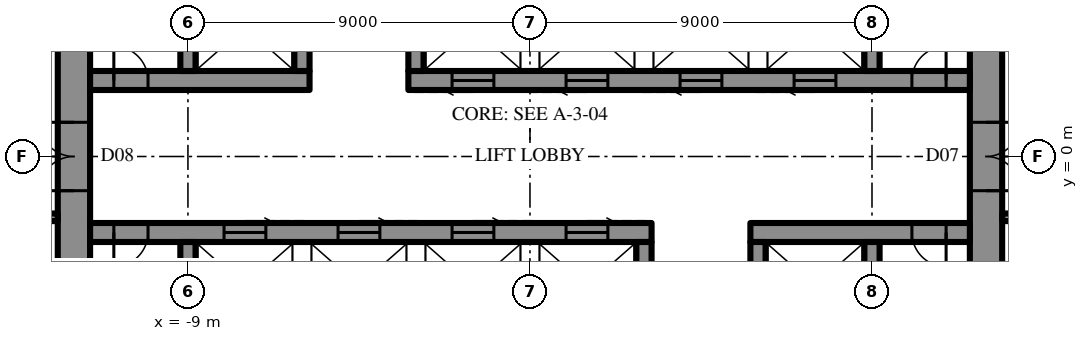
"""IFC4 building model, lengths in metres.
Left out: names, types, materials, properties, quantities, classifications, styles, units other than length and angle.
Written with IfcOpenShell. Run it as: python <this file> out.ifc"""

import sys

from ifc_helpers import new_model, si_unit, direction, frame, frame_2d, origin, place, context, subcontext, project, spatial, rectangle, extrude, element, fill, save


model = new_model("IFC4")
c1 = context("Model", 3, precision=1e-05, world=origin(), true_north=direction((0.0, 1.0)))
c2 = subcontext(c1, "Body", "Model", "MODEL_VIEW")
j1 = project(units=[si_unit("LENGTHUNIT", "METRE"), si_unit("PLANEANGLEUNIT", "RADIAN")], contexts=[c1])
p1 = place(None, origin())
s1 = spatial("IfcSite", under=j1, at=p1, CompositionType="ELEMENT")
p2 = place(p1, origin())
s2 = spatial("IfcBuilding", under=s1, at=p2, CompositionType="ELEMENT")
p3 = place(p2, frame((0.0, 0.0, 336.7)))
s3 = spatial("IfcBuildingStorey", under=s2, at=p3, CompositionType="ELEMENT", Elevation=336.7)
p4 = place(p3, frame((12.0, -10.7, 0.0), z_axis=(0.0, 0.0, 1.0), x_axis=(0.0, 1.0, 0.0)))
e1 = element("IfcWall", 1, at=p4, inside=s3, PredefinedType="SHEAR", context=c2, shape_type="SweptSolid", body=[
    extrude(rectangle(XDim=21.4, YDim=0.85, at=frame_2d((10.7, 0.0))), origin(), (0.0, 0.0, 1.0), 4.2),
])
p5 = place(p4, frame((9.8, 0.0, 0.0)))
e2 = element("IfcOpeningElement", 2, at=p5, cuts=e1, PredefinedType="OPENING", context=c2, shape_type="SweptSolid", body=[
    extrude(rectangle(XDim=1.8, YDim=2.4, at=frame_2d((0.9, 1.2))), frame((0.0, 0.435, 0.0), z_axis=(0.0, -1.0, 0.0), x_axis=(1.0, 0.0, 0.0)), (0.0, 0.0, 1.0), 0.87),
])
p6 = place(p3, frame((-12.0, 10.7, 0.0), z_axis=(0.0, 0.0, 1.0), x_axis=(0.0, -1.0, 0.0)))
e3 = element("IfcWall", 3, at=p6, inside=s3, PredefinedType="SHEAR", context=c2, shape_type="SweptSolid", body=[
    extrude(rectangle(XDim=21.4, YDim=0.85, at=frame_2d((10.7, 0.0))), origin(), (0.0, 0.0, 1.0), 4.2),
])
p7 = place(p6, frame((9.8, 0.0, 0.0)))
e4 = element("IfcOpeningElement", 4, at=p7, cuts=e3, PredefinedType="OPENING", context=c2, shape_type="SweptSolid", body=[
    extrude(rectangle(XDim=1.8, YDim=2.4, at=frame_2d((0.9, 1.2))), frame((0.0, 0.435, 0.0), z_axis=(0.0, -1.0, 0.0), x_axis=(1.0, 0.0, 0.0)), (0.0, 0.0, 1.0), 0.87),
])
p8 = place(p3, frame((-11.575, 2.0, 0.0), z_axis=(0.0, 0.0, 1.0), x_axis=(1.0, 0.0, 0.0)))
e5 = element("IfcWall", 5, at=p8, inside=s3, PredefinedType="SHEAR", context=c2, shape_type="SweptSolid", body=[
    extrude(rectangle(XDim=5.775, YDim=0.5, at=frame_2d((2.887, 0.0))), origin(), (0.0, 0.0, 1.0), 4.2),
])
p9 = place(p8, frame((0.625, 0.0, 0.0)))
e6 = element("IfcOpeningElement", 6, at=p9, cuts=e5, PredefinedType="OPENING", context=c2, shape_type="SweptSolid", body=[
    extrude(rectangle(XDim=0.9, YDim=2.2, at=frame_2d((0.45, 1.1))), frame((0.0, 0.26, 0.0), z_axis=(0.0, -1.0, 0.0), x_axis=(1.0, 0.0, 0.0)), (0.0, 0.0, 1.0), 0.52),
])
p10 = place(p3, frame((-3.2, 2.0, 0.0), z_axis=(0.0, 0.0, 1.0), x_axis=(1.0, 0.0, 0.0)))
e7 = element("IfcWall", 7, at=p10, inside=s3, PredefinedType="SHEAR", context=c2, shape_type="SweptSolid", body=[
    extrude(rectangle(XDim=14.775, YDim=0.5, at=frame_2d((7.387, 0.0))), origin(), (0.0, 0.0, 1.0), 4.2),
])
p11 = place(p10, frame((13.25, 0.0, 0.0)))
e8 = element("IfcOpeningElement", 8, at=p11, cuts=e7, PredefinedType="OPENING", context=c2, shape_type="SweptSolid", body=[
    extrude(rectangle(XDim=0.9, YDim=2.2, at=frame_2d((0.45, 1.1))), frame((0.0, 0.26, 0.0), z_axis=(0.0, -1.0, 0.0), x_axis=(1.0, 0.0, 0.0)), (0.0, 0.0, 1.0), 0.52),
])
p12 = place(p10, frame((1.15, 0.0, 0.0)))
e9 = element("IfcOpeningElement", 9, at=p12, cuts=e7, PredefinedType="OPENING", context=c2, shape_type="SweptSolid", body=[
    extrude(rectangle(XDim=1.1, YDim=2.2, at=frame_2d((0.55, 1.1))), frame((0.0, 0.26, 0.0), z_axis=(0.0, -1.0, 0.0), x_axis=(1.0, 0.0, 0.0)), (0.0, 0.0, 1.0), 0.52),
])
p13 = place(p10, frame((4.15, 0.0, 0.0)))
e10 = element("IfcOpeningElement", 10, at=p13, cuts=e7, PredefinedType="OPENING", context=c2, shape_type="SweptSolid", body=[
    extrude(rectangle(XDim=1.1, YDim=2.2, at=frame_2d((0.55, 1.1))), frame((0.0, 0.26, 0.0), z_axis=(0.0, -1.0, 0.0), x_axis=(1.0, 0.0, 0.0)), (0.0, 0.0, 1.0), 0.52),
])
p14 = place(p10, frame((7.15, 0.0, 0.0)))
e11 = element("IfcOpeningElement", 11, at=p14, cuts=e7, PredefinedType="OPENING", context=c2, shape_type="SweptSolid", body=[
    extrude(rectangle(XDim=1.1, YDim=2.2, at=frame_2d((0.55, 1.1))), frame((0.0, 0.26, 0.0), z_axis=(0.0, -1.0, 0.0), x_axis=(1.0, 0.0, 0.0)), (0.0, 0.0, 1.0), 0.52),
])
p15 = place(p10, frame((10.15, 0.0, 0.0)))
e12 = element("IfcOpeningElement", 12, at=p15, cuts=e7, PredefinedType="OPENING", context=c2, shape_type="SweptSolid", body=[
    extrude(rectangle(XDim=1.1, YDim=2.2, at=frame_2d((0.55, 1.1))), frame((0.0, 0.26, 0.0), z_axis=(0.0, -1.0, 0.0), x_axis=(1.0, 0.0, 0.0)), (0.0, 0.0, 1.0), 0.52),
])
for number, where, z_axis, x_axis in (
    (13, (-9.0, 2.25, 0.0), (0.0, 0.0, 1.0), (0.0, 1.0, 0.0)),
    (14, (-6.0, 2.25, 0.0), (0.0, 0.0, 1.0), (0.0, 1.0, 0.0)),
    (15, (-3.0, 2.25, 0.0), (0.0, 0.0, 1.0), (0.0, 1.0, 0.0)),
    (16, (9.0, 2.25, 0.0), (0.0, 0.0, 1.0), (0.0, 1.0, 0.0)),
):
    element("IfcWall", number, at=place(p3, frame(where, z_axis=z_axis, x_axis=x_axis)), inside=s3, PredefinedType="SHEAR", context=c2, shape_type="SweptSolid", body=[
        extrude(rectangle(XDim=2.3, YDim=0.4, at=frame_2d((1.15, 0.0))), origin(), (0.0, 0.0, 1.0), 4.2),
    ])
p16 = place(p3, frame((11.575, -2.0, 0.0), z_axis=(0.0, 0.0, 1.0), x_axis=(-1.0, 0.0, 0.0)))
e17 = element("IfcWall", 17, at=p16, inside=s3, PredefinedType="SHEAR", context=c2, shape_type="SweptSolid", body=[
    extrude(rectangle(XDim=5.775, YDim=0.5, at=frame_2d((2.887, 0.0))), origin(), (0.0, 0.0, 1.0), 4.2),
])
p17 = place(p16, frame((0.625, 0.0, 0.0)))
e18 = element("IfcOpeningElement", 18, at=p17, cuts=e17, PredefinedType="OPENING", context=c2, shape_type="SweptSolid", body=[
    extrude(rectangle(XDim=0.9, YDim=2.2, at=frame_2d((0.45, 1.1))), frame((0.0, 0.26, 0.0), z_axis=(0.0, -1.0, 0.0), x_axis=(1.0, 0.0, 0.0)), (0.0, 0.0, 1.0), 0.52),
])
p18 = place(p3, frame((3.2, -2.0, 0.0), z_axis=(0.0, 0.0, 1.0), x_axis=(-1.0, 0.0, 0.0)))
e19 = element("IfcWall", 19, at=p18, inside=s3, PredefinedType="SHEAR", context=c2, shape_type="SweptSolid", body=[
    extrude(rectangle(XDim=14.775, YDim=0.5, at=frame_2d((7.387, 0.0))), origin(), (0.0, 0.0, 1.0), 4.2),
])
p19 = place(p18, frame((13.25, 0.0, 0.0)))
e20 = element("IfcOpeningElement", 20, at=p19, cuts=e19, PredefinedType="OPENING", context=c2, shape_type="SweptSolid", body=[
    extrude(rectangle(XDim=0.9, YDim=2.2, at=frame_2d((0.45, 1.1))), frame((0.0, 0.26, 0.0), z_axis=(0.0, -1.0, 0.0), x_axis=(1.0, 0.0, 0.0)), (0.0, 0.0, 1.0), 0.52),
])
p20 = place(p18, frame((1.15, 0.0, 0.0)))
e21 = element("IfcOpeningElement", 21, at=p20, cuts=e19, PredefinedType="OPENING", context=c2, shape_type="SweptSolid", body=[
    extrude(rectangle(XDim=1.1, YDim=2.2, at=frame_2d((0.55, 1.1))), frame((0.0, 0.26, 0.0), z_axis=(0.0, -1.0, 0.0), x_axis=(1.0, 0.0, 0.0)), (0.0, 0.0, 1.0), 0.52),
])
p21 = place(p18, frame((4.15, 0.0, 0.0)))
e22 = element("IfcOpeningElement", 22, at=p21, cuts=e19, PredefinedType="OPENING", context=c2, shape_type="SweptSolid", body=[
    extrude(rectangle(XDim=1.1, YDim=2.2, at=frame_2d((0.55, 1.1))), frame((0.0, 0.26, 0.0), z_axis=(0.0, -1.0, 0.0), x_axis=(1.0, 0.0, 0.0)), (0.0, 0.0, 1.0), 0.52),
])
p22 = place(p18, frame((7.15, 0.0, 0.0)))
e23 = element("IfcOpeningElement", 23, at=p22, cuts=e19, PredefinedType="OPENING", context=c2, shape_type="SweptSolid", body=[
    extrude(rectangle(XDim=1.1, YDim=2.2, at=frame_2d((0.55, 1.1))), frame((0.0, 0.26, 0.0), z_axis=(0.0, -1.0, 0.0), x_axis=(1.0, 0.0, 0.0)), (0.0, 0.0, 1.0), 0.52),
])
p23 = place(p18, frame((10.15, 0.0, 0.0)))
e24 = element("IfcOpeningElement", 24, at=p23, cuts=e19, PredefinedType="OPENING", context=c2, shape_type="SweptSolid", body=[
    extrude(rectangle(XDim=1.1, YDim=2.2, at=frame_2d((0.55, 1.1))), frame((0.0, 0.26, 0.0), z_axis=(0.0, -1.0, 0.0), x_axis=(1.0, 0.0, 0.0)), (0.0, 0.0, 1.0), 0.52),
])
for number, where, z_axis, x_axis in (
    (25, (9.0, -2.25, 0.0), (0.0, 0.0, 1.0), (0.0, -1.0, 0.0)),
    (26, (6.0, -2.25, 0.0), (0.0, 0.0, 1.0), (0.0, -1.0, 0.0)),
    (27, (3.0, -2.25, 0.0), (0.0, 0.0, 1.0), (0.0, -1.0, 0.0)),
    (28, (-9.0, -2.25, 0.0), (0.0, 0.0, 1.0), (0.0, -1.0, 0.0)),
):
    element("IfcWall", number, at=place(p3, frame(where, z_axis=z_axis, x_axis=x_axis)), inside=s3, PredefinedType="SHEAR", context=c2, shape_type="SweptSolid", body=[
        extrude(rectangle(XDim=2.3, YDim=0.4, at=frame_2d((1.15, 0.0))), origin(), (0.0, 0.0, 1.0), 4.2),
    ])
p24 = place(p3, frame((12.425, -1.6, 0.0), z_axis=(0.0, 0.0, 1.0), x_axis=(1.0, 0.0, 0.0)))
e29 = element("IfcWall", 29, at=p24, inside=s3, PredefinedType="PARTITIONING", context=c2, shape_type="SweptSolid", body=[
    extrude(rectangle(XDim=16.5, YDim=0.2, at=frame_2d((8.25, 0.0))), origin(), (0.0, 0.0, 1.0), 4.0),
])
p25 = place(p24, frame((1.15, 0.0, 0.0)))
e30 = element("IfcOpeningElement", 30, at=p25, cuts=e29, PredefinedType="OPENING", context=c2, shape_type="SweptSolid", body=[
    extrude(rectangle(XDim=1.0, YDim=2.2, at=frame_2d((0.5, 1.1))), frame((0.0, 0.11, 0.0), z_axis=(0.0, -1.0, 0.0), x_axis=(1.0, 0.0, 0.0)), (0.0, 0.0, 1.0), 0.22),
])
p26 = place(p3, frame((-12.425, -1.6, 0.0), z_axis=(0.0, 0.0, 1.0), x_axis=(-1.0, 0.0, 0.0)))
e31 = element("IfcWall", 31, at=p26, inside=s3, PredefinedType="PARTITIONING", context=c2, shape_type="SweptSolid", body=[
    extrude(rectangle(XDim=16.5, YDim=0.2, at=frame_2d((8.25, 0.0))), origin(), (0.0, 0.0, 1.0), 4.0),
])
p27 = place(p26, frame((1.15, 0.0, 0.0)))
e32 = element("IfcOpeningElement", 32, at=p27, cuts=e31, PredefinedType="OPENING", context=c2, shape_type="SweptSolid", body=[
    extrude(rectangle(XDim=1.0, YDim=2.2, at=frame_2d((0.5, 1.1))), frame((0.0, 0.11, 0.0), z_axis=(0.0, -1.0, 0.0), x_axis=(1.0, 0.0, 0.0)), (0.0, 0.0, 1.0), 0.22),
])
p28 = place(p5, frame((1.8, 0.0, 0.0), z_axis=(0.0, 0.0, 1.0), x_axis=(-1.0, 0.0, 0.0)))
e33 = element("IfcDoor", 33, at=p28, inside=s3, OperationType="DOUBLE_DOOR_SINGLE_SWING", PredefinedType="DOOR", context=c2, shape_type="SweptSolid", body=[
    extrude(rectangle(XDim=1.8, YDim=2.4, at=frame_2d((0.9, 1.2))), frame((0.0, 0.025, 0.0), z_axis=(0.0, -1.0, 0.0), x_axis=(1.0, 0.0, 0.0)), (0.0, 0.0, 1.0), 0.05),
])
fill(e2, e33)
p29 = place(p7, frame((1.8, 0.0, 0.0), z_axis=(0.0, 0.0, 1.0), x_axis=(-1.0, 0.0, 0.0)))
e34 = element("IfcDoor", 34, at=p29, inside=s3, OperationType="DOUBLE_DOOR_SINGLE_SWING", PredefinedType="DOOR", context=c2, shape_type="SweptSolid", body=[
    extrude(rectangle(XDim=1.8, YDim=2.4, at=frame_2d((0.9, 1.2))), frame((0.0, 0.025, 0.0), z_axis=(0.0, -1.0, 0.0), x_axis=(1.0, 0.0, 0.0)), (0.0, 0.0, 1.0), 0.05),
])
fill(e4, e34)
p30 = place(p9, origin())
e35 = element("IfcDoor", 35, at=p30, inside=s3, OperationType="SINGLE_SWING_RIGHT", PredefinedType="DOOR", context=c2, shape_type="SweptSolid", body=[
    extrude(rectangle(XDim=0.9, YDim=2.2, at=frame_2d((0.45, 1.1))), frame((0.0, 0.025, 0.0), z_axis=(0.0, -1.0, 0.0), x_axis=(1.0, 0.0, 0.0)), (0.0, 0.0, 1.0), 0.05),
])
fill(e6, e35)
p31 = place(p11, origin())
e36 = element("IfcDoor", 36, at=p31, inside=s3, OperationType="SINGLE_SWING_LEFT", PredefinedType="DOOR", context=c2, shape_type="SweptSolid", body=[
    extrude(rectangle(XDim=0.9, YDim=2.2, at=frame_2d((0.45, 1.1))), frame((0.0, 0.025, 0.0), z_axis=(0.0, -1.0, 0.0), x_axis=(1.0, 0.0, 0.0)), (0.0, 0.0, 1.0), 0.05),
])
fill(e8, e36)
p32 = place(p17, origin())
e37 = element("IfcDoor", 37, at=p32, inside=s3, OperationType="SINGLE_SWING_RIGHT", PredefinedType="DOOR", context=c2, shape_type="SweptSolid", body=[
    extrude(rectangle(XDim=0.9, YDim=2.2, at=frame_2d((0.45, 1.1))), frame((0.0, 0.025, 0.0), z_axis=(0.0, -1.0, 0.0), x_axis=(1.0, 0.0, 0.0)), (0.0, 0.0, 1.0), 0.05),
])
fill(e18, e37)
p33 = place(p19, origin())
e38 = element("IfcDoor", 38, at=p33, inside=s3, OperationType="SINGLE_SWING_LEFT", PredefinedType="DOOR", context=c2, shape_type="SweptSolid", body=[
    extrude(rectangle(XDim=0.9, YDim=2.2, at=frame_2d((0.45, 1.1))), frame((0.0, 0.025, 0.0), z_axis=(0.0, -1.0, 0.0), x_axis=(1.0, 0.0, 0.0)), (0.0, 0.0, 1.0), 0.05),
])
fill(e20, e38)
p34 = place(p12, frame((1.1, 0.0, 0.0), z_axis=(0.0, 0.0, 1.0), x_axis=(-1.0, 0.0, 0.0)))
e39 = element("IfcDoor", 39, at=p34, inside=s3, OperationType="SLIDING_TO_LEFT", PredefinedType="DOOR", context=c2, shape_type="SweptSolid", body=[
    extrude(rectangle(XDim=1.1, YDim=2.2, at=frame_2d((0.55, 1.1))), frame((0.0, 0.025, 0.0), z_axis=(0.0, -1.0, 0.0), x_axis=(1.0, 0.0, 0.0)), (0.0, 0.0, 1.0), 0.05),
])
fill(e9, e39)
p35 = place(p13, frame((1.1, 0.0, 0.0), z_axis=(0.0, 0.0, 1.0), x_axis=(-1.0, 0.0, 0.0)))
e40 = element("IfcDoor", 40, at=p35, inside=s3, OperationType="SLIDING_TO_LEFT", PredefinedType="DOOR", context=c2, shape_type="SweptSolid", body=[
    extrude(rectangle(XDim=1.1, YDim=2.2, at=frame_2d((0.55, 1.1))), frame((0.0, 0.025, 0.0), z_axis=(0.0, -1.0, 0.0), x_axis=(1.0, 0.0, 0.0)), (0.0, 0.0, 1.0), 0.05),
])
fill(e10, e40)
p36 = place(p14, frame((1.1, 0.0, 0.0), z_axis=(0.0, 0.0, 1.0), x_axis=(-1.0, 0.0, 0.0)))
e41 = element("IfcDoor", 41, at=p36, inside=s3, OperationType="SLIDING_TO_LEFT", PredefinedType="DOOR", context=c2, shape_type="SweptSolid", body=[
    extrude(rectangle(XDim=1.1, YDim=2.2, at=frame_2d((0.55, 1.1))), frame((0.0, 0.025, 0.0), z_axis=(0.0, -1.0, 0.0), x_axis=(1.0, 0.0, 0.0)), (0.0, 0.0, 1.0), 0.05),
])
fill(e11, e41)
p37 = place(p15, frame((1.1, 0.0, 0.0), z_axis=(0.0, 0.0, 1.0), x_axis=(-1.0, 0.0, 0.0)))
e42 = element("IfcDoor", 42, at=p37, inside=s3, OperationType="SLIDING_TO_LEFT", PredefinedType="DOOR", context=c2, shape_type="SweptSolid", body=[
    extrude(rectangle(XDim=1.1, YDim=2.2, at=frame_2d((0.55, 1.1))), frame((0.0, 0.025, 0.0), z_axis=(0.0, -1.0, 0.0), x_axis=(1.0, 0.0, 0.0)), (0.0, 0.0, 1.0), 0.05),
])
fill(e12, e42)
p38 = place(p20, frame((1.1, 0.0, 0.0), z_axis=(0.0, 0.0, 1.0), x_axis=(-1.0, 0.0, 0.0)))
e43 = element("IfcDoor", 43, at=p38, inside=s3, OperationType="SLIDING_TO_LEFT", PredefinedType="DOOR", context=c2, shape_type="SweptSolid", body=[
    extrude(rectangle(XDim=1.1, YDim=2.2, at=frame_2d((0.55, 1.1))), frame((0.0, 0.025, 0.0), z_axis=(0.0, -1.0, 0.0), x_axis=(1.0, 0.0, 0.0)), (0.0, 0.0, 1.0), 0.05),
])
fill(e21, e43)
p39 = place(p21, frame((1.1, 0.0, 0.0), z_axis=(0.0, 0.0, 1.0), x_axis=(-1.0, 0.0, 0.0)))
e44 = element("IfcDoor", 44, at=p39, inside=s3, OperationType="SLIDING_TO_LEFT", PredefinedType="DOOR", context=c2, shape_type="SweptSolid", body=[
    extrude(rectangle(XDim=1.1, YDim=2.2, at=frame_2d((0.55, 1.1))), frame((0.0, 0.025, 0.0), z_axis=(0.0, -1.0, 0.0), x_axis=(1.0, 0.0, 0.0)), (0.0, 0.0, 1.0), 0.05),
])
fill(e22, e44)
p40 = place(p22, frame((1.1, 0.0, 0.0), z_axis=(0.0, 0.0, 1.0), x_axis=(-1.0, 0.0, 0.0)))
e45 = element("IfcDoor", 45, at=p40, inside=s3, OperationType="SLIDING_TO_LEFT", PredefinedType="DOOR", context=c2, shape_type="SweptSolid", body=[
    extrude(rectangle(XDim=1.1, YDim=2.2, at=frame_2d((0.55, 1.1))), frame((0.0, 0.025, 0.0), z_axis=(0.0, -1.0, 0.0), x_axis=(1.0, 0.0, 0.0)), (0.0, 0.0, 1.0), 0.05),
])
fill(e23, e45)
p41 = place(p23, frame((1.1, 0.0, 0.0), z_axis=(0.0, 0.0, 1.0), x_axis=(-1.0, 0.0, 0.0)))
e46 = element("IfcDoor", 46, at=p41, inside=s3, OperationType="SLIDING_TO_LEFT", PredefinedType="DOOR", context=c2, shape_type="SweptSolid", body=[
    extrude(rectangle(XDim=1.1, YDim=2.2, at=frame_2d((0.55, 1.1))), frame((0.0, 0.025, 0.0), z_axis=(0.0, -1.0, 0.0), x_axis=(1.0, 0.0, 0.0)), (0.0, 0.0, 1.0), 0.05),
])
fill(e24, e46)
save(model, sys.argv[1])
